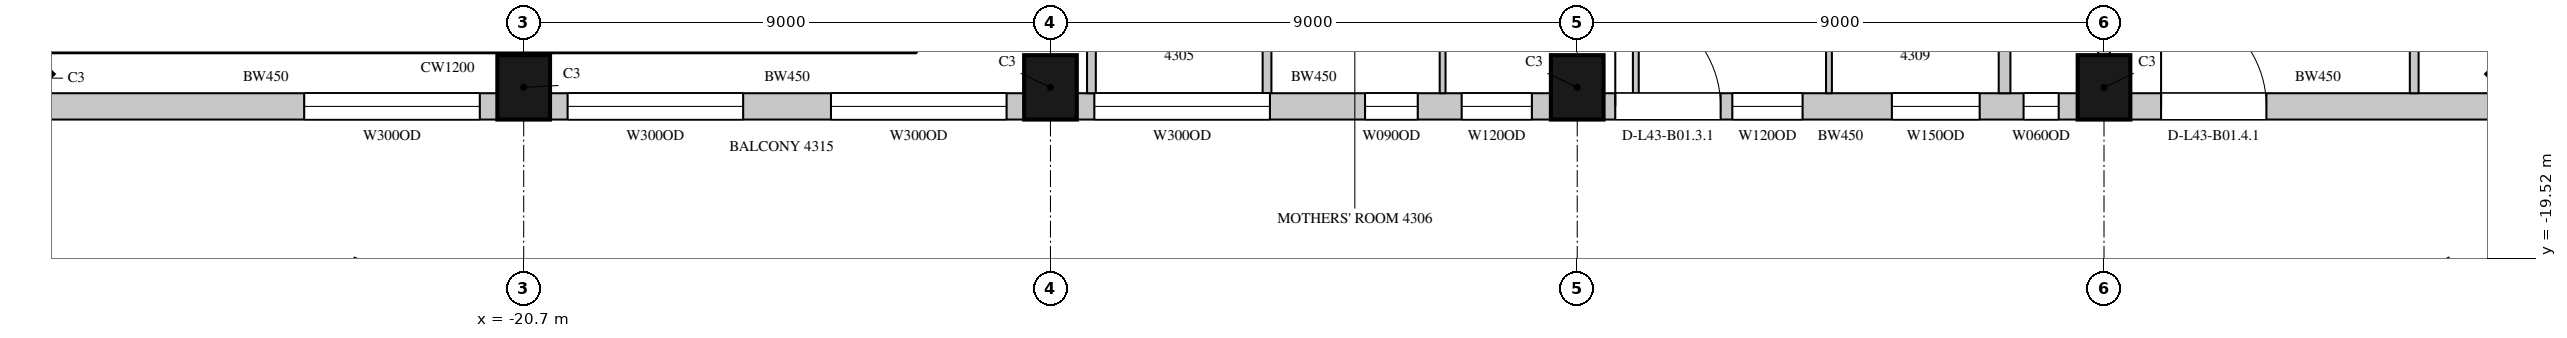
"""IFC4 building model, lengths in metres.
Left out: names, types, materials, properties, quantities, classifications, styles, units other than length and angle.
Written with IfcOpenShell. Run it as: python <this file> out.ifc"""

import sys

from ifc_helpers import new_model, si_unit, direction, frame, frame_2d, origin, origin_2d, place, context, subcontext, project, spatial, rectangle, extrude, element, fill, save


model = new_model("IFC4")
c1 = context("Model", 3, precision=1e-05, world=origin(), true_north=direction((0.0, 1.0)))
c2 = subcontext(c1, "Body", "Model", "MODEL_VIEW")
j1 = project(units=[si_unit("LENGTHUNIT", "METRE"), si_unit("PLANEANGLEUNIT", "RADIAN")], contexts=[c1])
p1 = place(None, origin())
s1 = spatial("IfcSite", under=j1, at=p1, CompositionType="ELEMENT")
p2 = place(p1, origin())
s2 = spatial("IfcBuilding", under=s1, at=p2, CompositionType="ELEMENT")
p3 = place(p2, frame((0.0, 0.0, 197.4)))
s3 = spatial("IfcBuildingStorey", under=s2, at=p3, CompositionType="ELEMENT", Elevation=197.4)
for number, where, z_axis, x_axis in (
    (1, (-29.443, -16.443, 0.0), (0.0, 0.0, 1.0), (0.707, -0.707, 0.0)),
    (2, (-20.7, -16.6, 0.0), (0.0, 0.0, 1.0), (1.0, 0.0, 0.0)),
    (3, (-11.7, -16.6, 0.0), (0.0, 0.0, 1.0), (1.0, 0.0, 0.0)),
    (4, (-2.7, -16.6, 0.0), (0.0, 0.0, 1.0), (1.0, 0.0, 0.0)),
    (5, (6.3, -16.6, 0.0), (0.0, 0.0, 1.0), (1.0, 0.0, 0.0)),
    (6, (13.543, -16.443, 0.0), (0.0, 0.0, 1.0), (0.707, 0.707, 0.0)),
):
    element("IfcColumn", number, at=place(p3, frame(where, z_axis=z_axis, x_axis=x_axis)), inside=s3, PredefinedType="COLUMN", context=c2, shape_type="SweptSolid", body=[
        extrude(rectangle(XDim=0.9, YDim=1.1, at=origin_2d()), origin(), (0.0, 0.0, 1.0), 4.1),
    ])
p4 = place(p3, frame((-29.064, -16.925, 0.0), z_axis=(0.0, 0.0, 1.0), x_axis=(1.0, 0.0, 0.0)))
e7 = element("IfcWall", 7, at=p4, inside=s3, PredefinedType="SOLIDWALL", context=c2, shape_type="SweptSolid", body=[
    extrude(rectangle(XDim=7.914, YDim=0.45, at=frame_2d((3.957, 0.0))), origin(), (0.0, 0.0, 1.0), 3.8),
])
p5 = place(p4, frame((4.614, 0.0, 1.05)))
e8 = element("IfcOpeningElement", 8, at=p5, cuts=e7, PredefinedType="OPENING", context=c2, shape_type="SweptSolid", body=[
    extrude(rectangle(XDim=3.0, YDim=2.4, at=frame_2d((1.5, 1.2))), frame((0.0, 0.235, 0.0), z_axis=(0.0, -1.0, 0.0), x_axis=(1.0, 0.0, 0.0)), (0.0, 0.0, 1.0), 0.47),
])
p6 = place(p3, frame((-20.25, -16.925, 0.0), z_axis=(0.0, 0.0, 1.0), x_axis=(1.0, 0.0, 0.0)))
e9 = element("IfcWall", 9, at=p6, inside=s3, PredefinedType="SOLIDWALL", context=c2, shape_type="SweptSolid", body=[
    extrude(rectangle(XDim=8.1, YDim=0.45, at=frame_2d((4.05, 0.0))), origin(), (0.0, 0.0, 1.0), 3.8),
])
p7 = place(p6, frame((0.3, 0.0, 1.05)))
e10 = element("IfcOpeningElement", 10, at=p7, cuts=e9, PredefinedType="OPENING", context=c2, shape_type="SweptSolid", body=[
    extrude(rectangle(XDim=3.0, YDim=2.4, at=frame_2d((1.5, 1.2))), frame((0.0, 0.235, 0.0), z_axis=(0.0, -1.0, 0.0), x_axis=(1.0, 0.0, 0.0)), (0.0, 0.0, 1.0), 0.47),
])
p8 = place(p6, frame((4.8, 0.0, 1.05)))
e11 = element("IfcOpeningElement", 11, at=p8, cuts=e9, PredefinedType="OPENING", context=c2, shape_type="SweptSolid", body=[
    extrude(rectangle(XDim=3.0, YDim=2.4, at=frame_2d((1.5, 1.2))), frame((0.0, 0.235, 0.0), z_axis=(0.0, -1.0, 0.0), x_axis=(1.0, 0.0, 0.0)), (0.0, 0.0, 1.0), 0.47),
])
p9 = place(p3, frame((-11.25, -16.925, 0.0), z_axis=(0.0, 0.0, 1.0), x_axis=(1.0, 0.0, 0.0)))
e12 = element("IfcWall", 12, at=p9, inside=s3, PredefinedType="SOLIDWALL", context=c2, shape_type="SweptSolid", body=[
    extrude(rectangle(XDim=8.1, YDim=0.45, at=frame_2d((4.05, 0.0))), origin(), (0.0, 0.0, 1.0), 3.8),
])
p10 = place(p9, frame((0.3, 0.0, 1.05)))
e13 = element("IfcOpeningElement", 13, at=p10, cuts=e12, PredefinedType="OPENING", context=c2, shape_type="SweptSolid", body=[
    extrude(rectangle(XDim=3.0, YDim=2.4, at=frame_2d((1.5, 1.2))), frame((0.0, 0.235, 0.0), z_axis=(0.0, -1.0, 0.0), x_axis=(1.0, 0.0, 0.0)), (0.0, 0.0, 1.0), 0.47),
])
p11 = place(p9, frame((4.925, 0.0, 1.05)))
e14 = element("IfcOpeningElement", 14, at=p11, cuts=e12, PredefinedType="OPENING", context=c2, shape_type="SweptSolid", body=[
    extrude(rectangle(XDim=0.9, YDim=2.4, at=frame_2d((0.45, 1.2))), frame((0.0, 0.235, 0.0), z_axis=(0.0, -1.0, 0.0), x_axis=(1.0, 0.0, 0.0)), (0.0, 0.0, 1.0), 0.47),
])
p12 = place(p9, frame((6.575, 0.0, 1.05)))
e15 = element("IfcOpeningElement", 15, at=p12, cuts=e12, PredefinedType="OPENING", context=c2, shape_type="SweptSolid", body=[
    extrude(rectangle(XDim=1.2, YDim=2.4, at=frame_2d((0.6, 1.2))), frame((0.0, 0.235, 0.0), z_axis=(0.0, -1.0, 0.0), x_axis=(1.0, 0.0, 0.0)), (0.0, 0.0, 1.0), 0.47),
])
p13 = place(p3, frame((-2.25, -16.925, 0.0), z_axis=(0.0, 0.0, 1.0), x_axis=(1.0, 0.0, 0.0)))
e16 = element("IfcWall", 16, at=p13, inside=s3, PredefinedType="SOLIDWALL", context=c2, shape_type="SweptSolid", body=[
    extrude(rectangle(XDim=8.1, YDim=0.45, at=frame_2d((4.05, 0.0))), origin(), (0.0, 0.0, 1.0), 3.8),
])
p14 = place(p13, frame((0.2, 0.0, 0.0)))
e17 = element("IfcOpeningElement", 17, at=p14, cuts=e16, PredefinedType="OPENING", context=c2, shape_type="SweptSolid", body=[
    extrude(rectangle(XDim=1.8, YDim=2.4, at=frame_2d((0.9, 1.2))), frame((0.0, 0.235, 0.0), z_axis=(0.0, -1.0, 0.0), x_axis=(1.0, 0.0, 0.0)), (0.0, 0.0, 1.0), 0.47),
])
p15 = place(p13, frame((2.2, 0.0, 1.05)))
e18 = element("IfcOpeningElement", 18, at=p15, cuts=e16, PredefinedType="OPENING", context=c2, shape_type="SweptSolid", body=[
    extrude(rectangle(XDim=1.2, YDim=2.4, at=frame_2d((0.6, 1.2))), frame((0.0, 0.235, 0.0), z_axis=(0.0, -1.0, 0.0), x_axis=(1.0, 0.0, 0.0)), (0.0, 0.0, 1.0), 0.47),
])
p16 = place(p13, frame((4.926, 0.0, 1.05)))
e19 = element("IfcOpeningElement", 19, at=p16, cuts=e16, PredefinedType="OPENING", context=c2, shape_type="SweptSolid", body=[
    extrude(rectangle(XDim=1.5, YDim=2.4, at=frame_2d((0.75, 1.2))), frame((0.0, 0.235, 0.0), z_axis=(0.0, -1.0, 0.0), x_axis=(1.0, 0.0, 0.0)), (0.0, 0.0, 1.0), 0.47),
])
p17 = place(p13, frame((7.176, 0.0, 1.05)))
e20 = element("IfcOpeningElement", 20, at=p17, cuts=e16, PredefinedType="OPENING", context=c2, shape_type="SweptSolid", body=[
    extrude(rectangle(XDim=0.6, YDim=2.4, at=frame_2d((0.3, 1.2))), frame((0.0, 0.235, 0.0), z_axis=(0.0, -1.0, 0.0), x_axis=(1.0, 0.0, 0.0)), (0.0, 0.0, 1.0), 0.47),
])
p18 = place(p3, frame((6.75, -16.925, 0.0), z_axis=(0.0, 0.0, 1.0), x_axis=(1.0, 0.0, 0.0)))
e21 = element("IfcWall", 21, at=p18, inside=s3, PredefinedType="SOLIDWALL", context=c2, shape_type="SweptSolid", body=[
    extrude(rectangle(XDim=6.414, YDim=0.45, at=frame_2d((3.207, 0.0))), origin(), (0.0, 0.0, 1.0), 3.8),
])
p19 = place(p18, frame((0.525, 0.0, 0.0)))
e22 = element("IfcOpeningElement", 22, at=p19, cuts=e21, PredefinedType="OPENING", context=c2, shape_type="SweptSolid", body=[
    extrude(rectangle(XDim=1.8, YDim=2.4, at=frame_2d((0.9, 1.2))), frame((0.0, 0.235, 0.0), z_axis=(0.0, -1.0, 0.0), x_axis=(1.0, 0.0, 0.0)), (0.0, 0.0, 1.0), 0.47),
])
p20 = place(p3, frame((-11.0, -16.7, 0.0), z_axis=(0.0, 0.0, 1.0), x_axis=(0.0, 1.0, 0.0)))
e23 = element("IfcWall", 23, at=p20, inside=s3, PredefinedType="PARTITIONING", context=c2, shape_type="SweptSolid", body=[
    extrude(rectangle(XDim=1.88, YDim=0.15, at=frame_2d((0.94, 0.0))), origin(), (0.0, 0.0, 1.0), 3.8),
])
p21 = place(p3, frame((-8.0, -16.7, 0.0), z_axis=(0.0, 0.0, 1.0), x_axis=(0.0, 1.0, 0.0)))
e24 = element("IfcWall", 24, at=p21, inside=s3, PredefinedType="PARTITIONING", context=c2, shape_type="SweptSolid", body=[
    extrude(rectangle(XDim=4.0, YDim=0.15, at=frame_2d((2.0, 0.0))), origin(), (0.0, 0.0, 1.0), 3.8),
])
p22 = place(p3, frame((11.6, -16.7, 0.0), z_axis=(0.0, 0.0, 1.0), x_axis=(0.0, 1.0, 0.0)))
e25 = element("IfcWall", 25, at=p22, inside=s3, PredefinedType="PARTITIONING", context=c2, shape_type="SweptSolid", body=[
    extrude(rectangle(XDim=4.1, YDim=0.15, at=frame_2d((2.05, 0.0))), origin(), (0.0, 0.0, 1.0), 3.8),
])
p23 = place(p3, frame((4.601, -16.7, 0.0), z_axis=(0.0, 0.0, 1.0), x_axis=(0.0, 1.0, 0.0)))
e26 = element("IfcWall", 26, at=p23, inside=s3, PredefinedType="PARTITIONING", context=c2, shape_type="SweptSolid", body=[
    extrude(rectangle(XDim=4.0, YDim=0.2, at=frame_2d((2.0, 0.0))), origin(), (0.0, 0.0, 1.0), 3.8),
])
p24 = place(p3, frame((6.3, -16.05, 0.0), z_axis=(0.0, 0.0, 1.0), x_axis=(0.0, 1.0, 0.0)))
e27 = element("IfcWall", 27, at=p24, inside=s3, PredefinedType="PARTITIONING", context=c2, shape_type="SweptSolid", body=[
    extrude(rectangle(XDim=3.35, YDim=0.2, at=frame_2d((1.675, 0.0))), origin(), (0.0, 0.0, 1.0), 3.25),
])
for number, where, z_axis, x_axis in (
    (28, (-5.0, -16.7, 0.0), (0.0, 0.0, 1.0), (0.0, 1.0, 0.0)),
    (29, (-1.699, -16.7, 0.0), (0.0, 0.0, 1.0), (0.0, 1.0, 0.0)),
):
    element("IfcWall", number, at=place(p3, frame(where, z_axis=z_axis, x_axis=x_axis)), inside=s3, PredefinedType="PARTITIONING", context=c2, shape_type="SweptSolid", body=[
        extrude(rectangle(XDim=4.0, YDim=0.1, at=frame_2d((2.0, 0.0))), origin(), (0.0, 0.0, 1.0), 3.8),
    ])
p25 = place(p3, frame((1.601, -16.7, 0.0), z_axis=(0.0, 0.0, 1.0), x_axis=(0.0, 1.0, 0.0)))
e30 = element("IfcWall", 30, at=p25, inside=s3, PredefinedType="PARTITIONING", context=c2, shape_type="SweptSolid", body=[
    extrude(rectangle(XDim=4.0, YDim=0.1, at=frame_2d((2.0, 0.0))), origin(), (0.0, 0.0, 1.0), 3.15),
])
p26 = place(p5, origin())
e31 = element("IfcWindow", 31, at=p26, inside=s3, PartitioningType="SINGLE_PANEL", PredefinedType="WINDOW", context=c2, shape_type="SweptSolid", body=[
    extrude(rectangle(XDim=3.0, YDim=2.4, at=frame_2d((1.5, 1.2))), frame((0.0, 0.135, 0.0), z_axis=(0.0, -1.0, 0.0), x_axis=(1.0, 0.0, 0.0)), (0.0, 0.0, 1.0), 0.06),
])
fill(e8, e31)
p27 = place(p7, origin())
e32 = element("IfcWindow", 32, at=p27, inside=s3, PartitioningType="SINGLE_PANEL", PredefinedType="WINDOW", context=c2, shape_type="SweptSolid", body=[
    extrude(rectangle(XDim=3.0, YDim=2.4, at=frame_2d((1.5, 1.2))), frame((0.0, 0.135, 0.0), z_axis=(0.0, -1.0, 0.0), x_axis=(1.0, 0.0, 0.0)), (0.0, 0.0, 1.0), 0.06),
])
fill(e10, e32)
p28 = place(p8, origin())
e33 = element("IfcWindow", 33, at=p28, inside=s3, PartitioningType="SINGLE_PANEL", PredefinedType="WINDOW", context=c2, shape_type="SweptSolid", body=[
    extrude(rectangle(XDim=3.0, YDim=2.4, at=frame_2d((1.5, 1.2))), frame((0.0, 0.135, 0.0), z_axis=(0.0, -1.0, 0.0), x_axis=(1.0, 0.0, 0.0)), (0.0, 0.0, 1.0), 0.06),
])
fill(e11, e33)
p29 = place(p10, origin())
e34 = element("IfcWindow", 34, at=p29, inside=s3, PartitioningType="SINGLE_PANEL", PredefinedType="WINDOW", context=c2, shape_type="SweptSolid", body=[
    extrude(rectangle(XDim=3.0, YDim=2.4, at=frame_2d((1.5, 1.2))), frame((0.0, 0.135, 0.0), z_axis=(0.0, -1.0, 0.0), x_axis=(1.0, 0.0, 0.0)), (0.0, 0.0, 1.0), 0.06),
])
fill(e13, e34)
p30 = place(p14, origin())
e35 = element("IfcDoor", 35, at=p30, inside=s3, OperationType="SLIDING_TO_LEFT", PredefinedType="DOOR", context=c2, shape_type="SweptSolid", body=[
    extrude(rectangle(XDim=1.8, YDim=2.4, at=frame_2d((0.9, 1.2))), frame((0.0, 0.13, 0.0), z_axis=(0.0, -1.0, 0.0), x_axis=(1.0, 0.0, 0.0)), (0.0, 0.0, 1.0), 0.05),
])
fill(e17, e35)
p31 = place(p15, origin())
e36 = element("IfcWindow", 36, at=p31, inside=s3, PartitioningType="SINGLE_PANEL", PredefinedType="WINDOW", context=c2, shape_type="SweptSolid", body=[
    extrude(rectangle(XDim=1.2, YDim=2.4, at=frame_2d((0.6, 1.2))), frame((0.0, 0.135, 0.0), z_axis=(0.0, -1.0, 0.0), x_axis=(1.0, 0.0, 0.0)), (0.0, 0.0, 1.0), 0.06),
])
fill(e18, e36)
p32 = place(p19, origin())
e37 = element("IfcDoor", 37, at=p32, inside=s3, OperationType="SLIDING_TO_LEFT", PredefinedType="DOOR", context=c2, shape_type="SweptSolid", body=[
    extrude(rectangle(XDim=1.8, YDim=2.4, at=frame_2d((0.9, 1.2))), frame((0.0, 0.13, 0.0), z_axis=(0.0, -1.0, 0.0), x_axis=(1.0, 0.0, 0.0)), (0.0, 0.0, 1.0), 0.05),
])
fill(e22, e37)
p33 = place(p11, origin())
e38 = element("IfcWindow", 38, at=p33, inside=s3, PartitioningType="SINGLE_PANEL", PredefinedType="WINDOW", context=c2, shape_type="SweptSolid", body=[
    extrude(rectangle(XDim=0.9, YDim=2.4, at=frame_2d((0.45, 1.2))), frame((0.0, 0.135, 0.0), z_axis=(0.0, -1.0, 0.0), x_axis=(1.0, 0.0, 0.0)), (0.0, 0.0, 1.0), 0.06),
])
fill(e14, e38)
p34 = place(p12, origin())
e39 = element("IfcWindow", 39, at=p34, inside=s3, PartitioningType="SINGLE_PANEL", PredefinedType="WINDOW", context=c2, shape_type="SweptSolid", body=[
    extrude(rectangle(XDim=1.2, YDim=2.4, at=frame_2d((0.6, 1.2))), frame((0.0, 0.135, 0.0), z_axis=(0.0, -1.0, 0.0), x_axis=(1.0, 0.0, 0.0)), (0.0, 0.0, 1.0), 0.06),
])
fill(e15, e39)
p35 = place(p16, origin())
e40 = element("IfcWindow", 40, at=p35, inside=s3, PartitioningType="SINGLE_PANEL", PredefinedType="WINDOW", context=c2, shape_type="SweptSolid", body=[
    extrude(rectangle(XDim=1.5, YDim=2.4, at=frame_2d((0.75, 1.2))), frame((0.0, 0.135, 0.0), z_axis=(0.0, -1.0, 0.0), x_axis=(1.0, 0.0, 0.0)), (0.0, 0.0, 1.0), 0.06),
])
fill(e19, e40)
p36 = place(p17, origin())
e41 = element("IfcWindow", 41, at=p36, inside=s3, PartitioningType="SINGLE_PANEL", PredefinedType="WINDOW", context=c2, shape_type="SweptSolid", body=[
    extrude(rectangle(XDim=0.6, YDim=2.4, at=frame_2d((0.3, 1.2))), frame((0.0, 0.135, 0.0), z_axis=(0.0, -1.0, 0.0), x_axis=(1.0, 0.0, 0.0)), (0.0, 0.0, 1.0), 0.06),
])
fill(e20, e41)
save(model, sys.argv[1])
